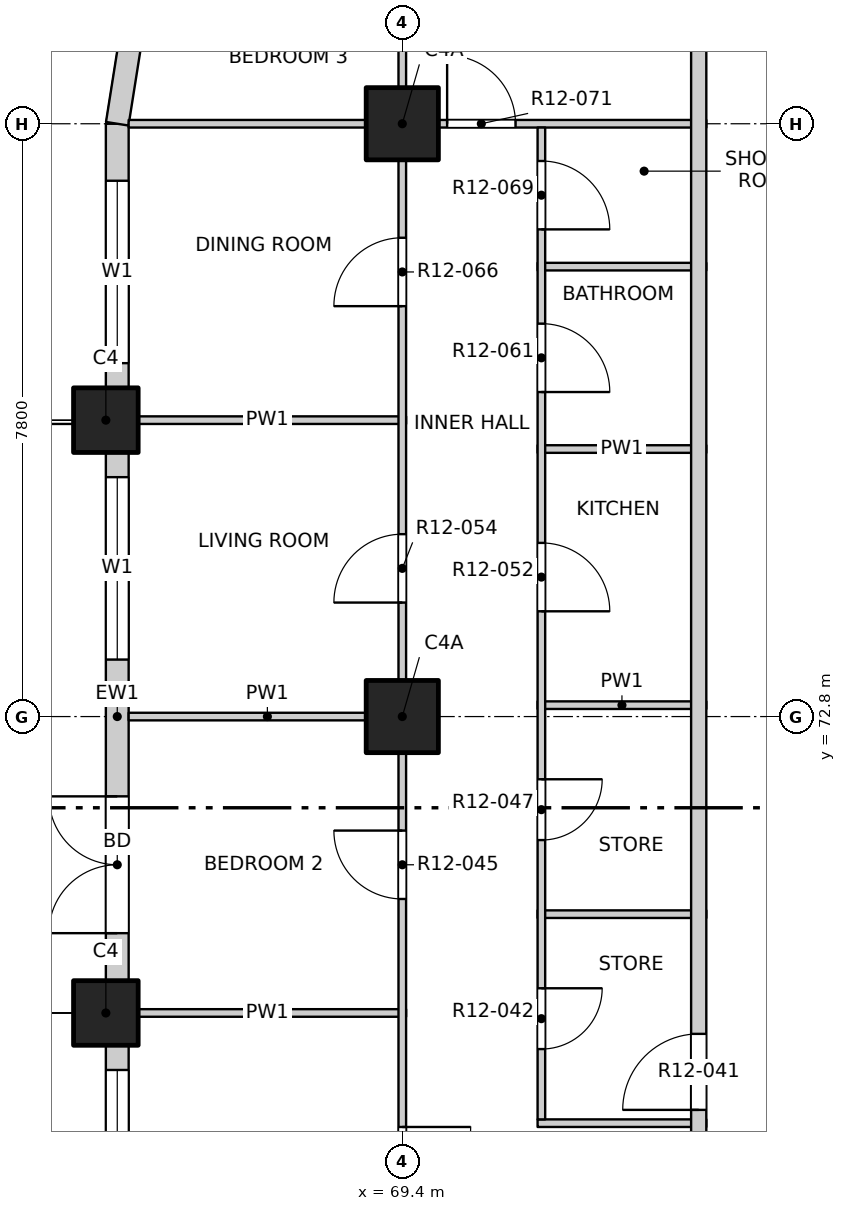
"""IFC4 building model, lengths in metres.
Left out: names, types, materials, properties, quantities, classifications, styles, units other than length and angle.
Written with IfcOpenShell. Run it as: python <this file> out.ifc"""

import sys

from ifc_helpers import new_model, si_unit, direction, frame, frame_2d, origin, origin_2d, place, context, subcontext, project, spatial, rectangle, extrude, element, fill, save


model = new_model("IFC4")
c1 = context("Model", 3, precision=1e-05, world=origin(), true_north=direction((0.0, 1.0)))
c2 = subcontext(c1, "Body", "Model", "MODEL_VIEW")
j1 = project(units=[si_unit("LENGTHUNIT", "METRE"), si_unit("PLANEANGLEUNIT", "RADIAN")], contexts=[c1])
p1 = place(None, origin())
s1 = spatial("IfcSite", under=j1, at=p1, CompositionType="ELEMENT")
p2 = place(p1, origin())
s2 = spatial("IfcBuilding", under=s1, at=p2, CompositionType="ELEMENT")
p3 = place(p2, frame((0.0, 0.0, 137.3)))
s3 = spatial("IfcBuildingStorey", under=s2, at=p3, CompositionType="ELEMENT", Elevation=137.3)
for number, where, z_axis, x_axis in (
    (1, (65.5, 68.9, -0.25), (0.0, 0.0, 1.0), (1.0, 0.0, 0.0)),
    (2, (65.5, 76.7, -0.25), (0.0, 0.0, 1.0), (1.0, 0.0, 0.0)),
):
    element("IfcColumn", number, at=place(p3, frame(where, z_axis=z_axis, x_axis=x_axis)), inside=s3, PredefinedType="COLUMN", context=c2, shape_type="SweptSolid", body=[
        extrude(rectangle(XDim=0.85, YDim=0.85, at=origin_2d()), origin(), (0.0, 0.0, 1.0), 3.4),
    ])
for number, where, z_axis, x_axis in (
    (3, (69.4, 72.8, -0.25), (0.0, 0.0, 1.0), (1.0, 0.0, 0.0)),
    (4, (69.4, 80.6, -0.25), (0.0, 0.0, 1.0), (1.0, 0.0, 0.0)),
):
    element("IfcColumn", number, at=place(p3, frame(where, z_axis=z_axis, x_axis=x_axis)), inside=s3, PredefinedType="COLUMN", context=c2, shape_type="SweptSolid", body=[
        extrude(rectangle(XDim=0.95, YDim=0.95, at=origin_2d()), origin(), (0.0, 0.0, 1.0), 3.4),
    ])
p4 = place(p3, frame((65.65, 61.525, 0.0), z_axis=(0.0, 0.0, 1.0), x_axis=(0.0, 1.0, 0.0)))
e5 = element("IfcWall", 5, at=p4, inside=s3, PredefinedType="SOLIDWALL", context=c2, shape_type="SweptSolid", body=[
    extrude(rectangle(XDim=6.95, YDim=0.3, at=frame_2d((3.475, 0.0))), origin(), (0.0, 0.0, 1.0), 2.7),
])
p5 = place(p4, frame((0.625, 0.0, 0.0)))
e6 = element("IfcOpeningElement", 6, at=p5, cuts=e5, PredefinedType="OPENING", context=c2, shape_type="SweptSolid", body=[
    extrude(rectangle(XDim=1.8, YDim=2.4, at=frame_2d((0.9, 1.2))), frame((0.0, 0.16, 0.0), z_axis=(0.0, -1.0, 0.0), x_axis=(1.0, 0.0, 0.0)), (0.0, 0.0, 1.0), 0.32),
])
p6 = place(p4, frame((4.225, 0.0, 0.9)))
e7 = element("IfcOpeningElement", 7, at=p6, cuts=e5, PredefinedType="OPENING", context=c2, shape_type="SweptSolid", body=[
    extrude(rectangle(XDim=2.4, YDim=1.8, at=frame_2d((1.2, 0.9))), frame((0.0, 0.16, 0.0), z_axis=(0.0, -1.0, 0.0), x_axis=(1.0, 0.0, 0.0)), (0.0, 0.0, 1.0), 0.32),
])
p7 = place(p3, frame((65.65, 69.325, 0.0), z_axis=(0.0, 0.0, 1.0), x_axis=(0.0, 1.0, 0.0)))
e8 = element("IfcWall", 8, at=p7, inside=s3, PredefinedType="SOLIDWALL", context=c2, shape_type="SweptSolid", body=[
    extrude(rectangle(XDim=6.95, YDim=0.3, at=frame_2d((3.475, 0.0))), origin(), (0.0, 0.0, 1.0), 2.7),
])
p8 = place(p7, frame((0.625, 0.0, 0.0)))
e9 = element("IfcOpeningElement", 9, at=p8, cuts=e8, PredefinedType="OPENING", context=c2, shape_type="SweptSolid", body=[
    extrude(rectangle(XDim=1.8, YDim=2.4, at=frame_2d((0.9, 1.2))), frame((0.0, 0.16, 0.0), z_axis=(0.0, -1.0, 0.0), x_axis=(1.0, 0.0, 0.0)), (0.0, 0.0, 1.0), 0.32),
])
p9 = place(p7, frame((4.225, 0.0, 0.9)))
e10 = element("IfcOpeningElement", 10, at=p9, cuts=e8, PredefinedType="OPENING", context=c2, shape_type="SweptSolid", body=[
    extrude(rectangle(XDim=2.4, YDim=1.8, at=frame_2d((1.2, 0.9))), frame((0.0, 0.16, 0.0), z_axis=(0.0, -1.0, 0.0), x_axis=(1.0, 0.0, 0.0)), (0.0, 0.0, 1.0), 0.32),
])
p10 = place(p3, frame((65.65, 77.125, 0.0), z_axis=(0.0, 0.0, 1.0), x_axis=(0.0, 1.0, 0.0)))
e11 = element("IfcWall", 11, at=p10, inside=s3, PredefinedType="SOLIDWALL", context=c2, shape_type="SweptSolid", body=[
    extrude(rectangle(XDim=3.475, YDim=0.3, at=frame_2d((1.738, 0.0))), origin(), (0.0, 0.0, 1.0), 2.7),
])
p11 = place(p10, frame((0.325, 0.0, 0.9)))
e12 = element("IfcOpeningElement", 12, at=p11, cuts=e11, PredefinedType="OPENING", context=c2, shape_type="SweptSolid", body=[
    extrude(rectangle(XDim=2.4, YDim=1.8, at=frame_2d((1.2, 0.9))), frame((0.0, 0.16, 0.0), z_axis=(0.0, -1.0, 0.0), x_axis=(1.0, 0.0, 0.0)), (0.0, 0.0, 1.0), 0.32),
])
p12 = place(p3, frame((65.833, 81.759, 0.0), z_axis=(0.0, 0.0, 1.0), x_axis=(-0.156496880861, -0.987678452879, 0.0)))
e13 = element("IfcWall", 13, at=p12, inside=s3, PredefinedType="SOLIDWALL", context=c2, shape_type="SweptSolid", body=[
    extrude(rectangle(XDim=1.173, YDim=0.3, at=frame_2d((0.586, 0.0))), origin(), (0.0, 0.0, 1.0), 2.7),
])
p13 = place(p3, frame((71.18, 67.45, 0.0), z_axis=(0.0, 0.0, 1.0), x_axis=(1.0, 0.0, 0.0)))
e14 = element("IfcWall", 14, at=p13, inside=s3, PredefinedType="PARTITIONING", context=c2, shape_type="SweptSolid", body=[
    extrude(rectangle(XDim=2.22, YDim=0.1, at=frame_2d((1.11, 0.0))), origin(), (0.0, 0.0, 1.0), 3.15),
])
p14 = place(p3, frame((65.8, 68.9, 0.0), z_axis=(0.0, 0.0, 1.0), x_axis=(1.0, 0.0, 0.0)))
e15 = element("IfcWall", 15, at=p14, inside=s3, PredefinedType="PARTITIONING", context=c2, shape_type="SweptSolid", body=[
    extrude(rectangle(XDim=3.65, YDim=0.1, at=frame_2d((1.825, 0.0))), origin(), (0.0, 0.0, 1.0), 2.55),
])
p15 = place(p3, frame((71.18, 70.2, 0.0), z_axis=(0.0, 0.0, 1.0), x_axis=(1.0, 0.0, 0.0)))
e16 = element("IfcWall", 16, at=p15, inside=s3, PredefinedType="PARTITIONING", context=c2, shape_type="SweptSolid", body=[
    extrude(rectangle(XDim=2.22, YDim=0.1, at=frame_2d((1.11, 0.0))), origin(), (0.0, 0.0, 1.0), 3.15),
])
p16 = place(p3, frame((65.8, 72.8, 0.0), z_axis=(0.0, 0.0, 1.0), x_axis=(1.0, 0.0, 0.0)))
e17 = element("IfcWall", 17, at=p16, inside=s3, PredefinedType="PARTITIONING", context=c2, shape_type="SweptSolid", body=[
    extrude(rectangle(XDim=3.65, YDim=0.1, at=frame_2d((1.825, 0.0))), origin(), (0.0, 0.0, 1.0), 3.15),
])
for number, where, z_axis, x_axis in (
    (18, (71.18, 72.95, 0.0), (0.0, 0.0, 1.0), (1.0, 0.0, 0.0)),
    (19, (71.18, 76.32, 0.0), (0.0, 0.0, 1.0), (1.0, 0.0, 0.0)),
):
    element("IfcWall", number, at=place(p3, frame(where, z_axis=z_axis, x_axis=x_axis)), inside=s3, PredefinedType="PARTITIONING", context=c2, shape_type="SweptSolid", body=[
        extrude(rectangle(XDim=2.22, YDim=0.1, at=frame_2d((1.11, 0.0))), origin(), (0.0, 0.0, 1.0), 3.15),
    ])
p17 = place(p3, frame((65.8, 76.7, 0.0), z_axis=(0.0, 0.0, 1.0), x_axis=(1.0, 0.0, 0.0)))
e20 = element("IfcWall", 20, at=p17, inside=s3, PredefinedType="PARTITIONING", context=c2, shape_type="SweptSolid", body=[
    extrude(rectangle(XDim=3.65, YDim=0.1, at=frame_2d((1.825, 0.0))), origin(), (0.0, 0.0, 1.0), 2.55),
])
p18 = place(p3, frame((71.18, 78.72, 0.0), z_axis=(0.0, 0.0, 1.0), x_axis=(1.0, 0.0, 0.0)))
e21 = element("IfcWall", 21, at=p18, inside=s3, PredefinedType="PARTITIONING", context=c2, shape_type="SweptSolid", body=[
    extrude(rectangle(XDim=2.22, YDim=0.1, at=frame_2d((1.11, 0.0))), origin(), (0.0, 0.0, 1.0), 3.15),
])
p19 = place(p3, frame((65.8, 80.6, 0.0), z_axis=(0.0, 0.0, 1.0), x_axis=(1.0, 0.0, 0.0)))
e22 = element("IfcWall", 22, at=p19, inside=s3, PredefinedType="PARTITIONING", context=c2, shape_type="SweptSolid", body=[
    extrude(rectangle(XDim=7.6, YDim=0.1, at=frame_2d((3.8, 0.0))), origin(), (0.0, 0.0, 1.0), 3.15),
])
p20 = place(p19, frame((4.19, 0.0, 0.0)))
e23 = element("IfcOpeningElement", 23, at=p20, cuts=e22, PredefinedType="OPENING", context=c2, shape_type="SweptSolid", body=[
    extrude(rectangle(XDim=0.9, YDim=2.1, at=frame_2d((0.45, 1.05))), frame((0.0, 0.06, 0.0), z_axis=(0.0, -1.0, 0.0), x_axis=(1.0, 0.0, 0.0)), (0.0, 0.0, 1.0), 0.12),
])
p21 = place(p3, frame((69.4, 45.8, 0.0), z_axis=(0.0, 0.0, 1.0), x_axis=(0.0, 1.0, 0.0)))
e24 = element("IfcWall", 24, at=p21, inside=s3, PredefinedType="PARTITIONING", context=c2, shape_type="SweptSolid", body=[
    extrude(rectangle(XDim=38.4, YDim=0.1, at=frame_2d((19.2, 0.0))), origin(), (0.0, 0.0, 1.0), 3.15),
])
p22 = place(p21, frame((1.05, 0.0, 0.0)))
e25 = element("IfcOpeningElement", 25, at=p22, cuts=e24, PredefinedType="OPENING", context=c2, shape_type="SweptSolid", body=[
    extrude(rectangle(XDim=1.2, YDim=2.1, at=frame_2d((0.6, 1.05))), frame((0.0, 0.06, 0.0), z_axis=(0.0, -1.0, 0.0), x_axis=(1.0, 0.0, 0.0)), (0.0, 0.0, 1.0), 0.12),
])
p23 = place(p21, frame((5.1, 0.0, 0.0)))
e26 = element("IfcOpeningElement", 26, at=p23, cuts=e24, PredefinedType="OPENING", context=c2, shape_type="SweptSolid", body=[
    extrude(rectangle(XDim=0.9, YDim=2.1, at=frame_2d((0.45, 1.05))), frame((0.0, 0.06, 0.0), z_axis=(0.0, -1.0, 0.0), x_axis=(1.0, 0.0, 0.0)), (0.0, 0.0, 1.0), 0.12),
])
p24 = place(p21, frame((9.0, 0.0, 0.0)))
e27 = element("IfcOpeningElement", 27, at=p24, cuts=e24, PredefinedType="OPENING", context=c2, shape_type="SweptSolid", body=[
    extrude(rectangle(XDim=0.9, YDim=2.1, at=frame_2d((0.45, 1.05))), frame((0.0, 0.06, 0.0), z_axis=(0.0, -1.0, 0.0), x_axis=(1.0, 0.0, 0.0)), (0.0, 0.0, 1.0), 0.12),
])
p25 = place(p21, frame((12.9, 0.0, 0.0)))
e28 = element("IfcOpeningElement", 28, at=p25, cuts=e24, PredefinedType="OPENING", context=c2, shape_type="SweptSolid", body=[
    extrude(rectangle(XDim=0.9, YDim=2.1, at=frame_2d((0.45, 1.05))), frame((0.0, 0.06, 0.0), z_axis=(0.0, -1.0, 0.0), x_axis=(1.0, 0.0, 0.0)), (0.0, 0.0, 1.0), 0.12),
])
p26 = place(p21, frame((16.8, 0.0, 0.0)))
e29 = element("IfcOpeningElement", 29, at=p26, cuts=e24, PredefinedType="OPENING", context=c2, shape_type="SweptSolid", body=[
    extrude(rectangle(XDim=0.9, YDim=2.1, at=frame_2d((0.45, 1.05))), frame((0.0, 0.06, 0.0), z_axis=(0.0, -1.0, 0.0), x_axis=(1.0, 0.0, 0.0)), (0.0, 0.0, 1.0), 0.12),
])
p27 = place(p21, frame((20.7, 0.0, 0.0)))
e30 = element("IfcOpeningElement", 30, at=p27, cuts=e24, PredefinedType="OPENING", context=c2, shape_type="SweptSolid", body=[
    extrude(rectangle(XDim=0.9, YDim=2.1, at=frame_2d((0.45, 1.05))), frame((0.0, 0.06, 0.0), z_axis=(0.0, -1.0, 0.0), x_axis=(1.0, 0.0, 0.0)), (0.0, 0.0, 1.0), 0.12),
])
p28 = place(p21, frame((24.6, 0.0, 0.0)))
e31 = element("IfcOpeningElement", 31, at=p28, cuts=e24, PredefinedType="OPENING", context=c2, shape_type="SweptSolid", body=[
    extrude(rectangle(XDim=0.9, YDim=2.1, at=frame_2d((0.45, 1.05))), frame((0.0, 0.06, 0.0), z_axis=(0.0, -1.0, 0.0), x_axis=(1.0, 0.0, 0.0)), (0.0, 0.0, 1.0), 0.12),
])
p29 = place(p21, frame((28.5, 0.0, 0.0)))
e32 = element("IfcOpeningElement", 32, at=p29, cuts=e24, PredefinedType="OPENING", context=c2, shape_type="SweptSolid", body=[
    extrude(rectangle(XDim=0.9, YDim=2.1, at=frame_2d((0.45, 1.05))), frame((0.0, 0.06, 0.0), z_axis=(0.0, -1.0, 0.0), x_axis=(1.0, 0.0, 0.0)), (0.0, 0.0, 1.0), 0.12),
])
p30 = place(p21, frame((32.4, 0.0, 0.0)))
e33 = element("IfcOpeningElement", 33, at=p30, cuts=e24, PredefinedType="OPENING", context=c2, shape_type="SweptSolid", body=[
    extrude(rectangle(XDim=0.9, YDim=2.1, at=frame_2d((0.45, 1.05))), frame((0.0, 0.06, 0.0), z_axis=(0.0, -1.0, 0.0), x_axis=(1.0, 0.0, 0.0)), (0.0, 0.0, 1.0), 0.12),
])
p31 = place(p21, frame((36.15, 0.0, 0.0)))
e34 = element("IfcOpeningElement", 34, at=p31, cuts=e24, PredefinedType="OPENING", context=c2, shape_type="SweptSolid", body=[
    extrude(rectangle(XDim=1.2, YDim=2.1, at=frame_2d((0.6, 1.05))), frame((0.0, 0.06, 0.0), z_axis=(0.0, -1.0, 0.0), x_axis=(1.0, 0.0, 0.0)), (0.0, 0.0, 1.0), 0.12),
])
p32 = place(p3, frame((71.23, 67.5, 0.0), z_axis=(0.0, 0.0, 1.0), x_axis=(0.0, 1.0, 0.0)))
e35 = element("IfcWall", 35, at=p32, inside=s3, PredefinedType="PARTITIONING", context=c2, shape_type="SweptSolid", body=[
    extrude(rectangle(XDim=13.05, YDim=0.1, at=frame_2d((6.525, 0.0))), origin(), (0.0, 0.0, 1.0), 3.15),
])
p33 = place(p32, frame((0.925, 0.0, 0.0)))
e36 = element("IfcOpeningElement", 36, at=p33, cuts=e35, PredefinedType="OPENING", context=c2, shape_type="SweptSolid", body=[
    extrude(rectangle(XDim=0.8, YDim=2.1, at=frame_2d((0.4, 1.05))), frame((0.0, 0.06, 0.0), z_axis=(0.0, -1.0, 0.0), x_axis=(1.0, 0.0, 0.0)), (0.0, 0.0, 1.0), 0.12),
])
p34 = place(p32, frame((3.675, 0.0, 0.0)))
e37 = element("IfcOpeningElement", 37, at=p34, cuts=e35, PredefinedType="OPENING", context=c2, shape_type="SweptSolid", body=[
    extrude(rectangle(XDim=0.8, YDim=2.1, at=frame_2d((0.4, 1.05))), frame((0.0, 0.06, 0.0), z_axis=(0.0, -1.0, 0.0), x_axis=(1.0, 0.0, 0.0)), (0.0, 0.0, 1.0), 0.12),
])
p35 = place(p32, frame((6.685, 0.0, 0.0)))
e38 = element("IfcOpeningElement", 38, at=p35, cuts=e35, PredefinedType="OPENING", context=c2, shape_type="SweptSolid", body=[
    extrude(rectangle(XDim=0.9, YDim=2.1, at=frame_2d((0.45, 1.05))), frame((0.0, 0.06, 0.0), z_axis=(0.0, -1.0, 0.0), x_axis=(1.0, 0.0, 0.0)), (0.0, 0.0, 1.0), 0.12),
])
p36 = place(p32, frame((9.57, 0.0, 0.0)))
e39 = element("IfcOpeningElement", 39, at=p36, cuts=e35, PredefinedType="OPENING", context=c2, shape_type="SweptSolid", body=[
    extrude(rectangle(XDim=0.9, YDim=2.1, at=frame_2d((0.45, 1.05))), frame((0.0, 0.06, 0.0), z_axis=(0.0, -1.0, 0.0), x_axis=(1.0, 0.0, 0.0)), (0.0, 0.0, 1.0), 0.12),
])
p37 = place(p32, frame((11.71, 0.0, 0.0)))
e40 = element("IfcOpeningElement", 40, at=p37, cuts=e35, PredefinedType="OPENING", context=c2, shape_type="SweptSolid", body=[
    extrude(rectangle(XDim=0.9, YDim=2.1, at=frame_2d((0.45, 1.05))), frame((0.0, 0.06, 0.0), z_axis=(0.0, -1.0, 0.0), x_axis=(1.0, 0.0, 0.0)), (0.0, 0.0, 1.0), 0.12),
])
p38 = place(p3, frame((73.3, 49.5, 0.0), z_axis=(0.0, 0.0, 1.0), x_axis=(0.0, 1.0, 0.0)))
e41 = element("IfcWall", 41, at=p38, inside=s3, PredefinedType="PARTITIONING", context=c2, shape_type="SweptSolid", body=[
    extrude(rectangle(XDim=34.7, YDim=0.2, at=frame_2d((17.35, 0.0))), origin(), (0.0, 0.0, 1.0), 3.15),
])
p39 = place(p38, frame((6.975, 0.0, 0.0)))
e42 = element("IfcOpeningElement", 42, at=p39, cuts=e41, PredefinedType="OPENING", context=c2, shape_type="SweptSolid", body=[
    extrude(rectangle(XDim=1.0, YDim=2.1, at=frame_2d((0.5, 1.05))), frame((0.0, 0.11, 0.0), z_axis=(0.0, -1.0, 0.0), x_axis=(1.0, 0.0, 0.0)), (0.0, 0.0, 1.0), 0.22),
])
p40 = place(p38, frame((18.125, 0.0, 0.0)))
e43 = element("IfcOpeningElement", 43, at=p40, cuts=e41, PredefinedType="OPENING", context=c2, shape_type="SweptSolid", body=[
    extrude(rectangle(XDim=1.0, YDim=2.1, at=frame_2d((0.5, 1.05))), frame((0.0, 0.11, 0.0), z_axis=(0.0, -1.0, 0.0), x_axis=(1.0, 0.0, 0.0)), (0.0, 0.0, 1.0), 0.22),
])
p41 = place(p6, origin())
e44 = element("IfcWindow", 44, at=p41, inside=s3, PartitioningType="DOUBLE_PANEL_VERTICAL", PredefinedType="WINDOW", context=c2, shape_type="SweptSolid", body=[
    extrude(rectangle(XDim=2.4, YDim=1.8, at=frame_2d((1.2, 0.9))), frame((0.0, 0.03, 0.0), z_axis=(0.0, -1.0, 0.0), x_axis=(1.0, 0.0, 0.0)), (0.0, 0.0, 1.0), 0.06),
])
fill(e7, e44)
p42 = place(p8, origin())
e45 = element("IfcDoor", 45, at=p42, inside=s3, OperationType="DOUBLE_DOOR_SINGLE_SWING", PredefinedType="DOOR", context=c2, shape_type="SweptSolid", body=[
    extrude(rectangle(XDim=1.8, YDim=2.4, at=frame_2d((0.9, 1.2))), frame((0.0, 0.025, 0.0), z_axis=(0.0, -1.0, 0.0), x_axis=(1.0, 0.0, 0.0)), (0.0, 0.0, 1.0), 0.05),
])
fill(e9, e45)
p43 = place(p9, origin())
e46 = element("IfcWindow", 46, at=p43, inside=s3, PartitioningType="DOUBLE_PANEL_VERTICAL", PredefinedType="WINDOW", context=c2, shape_type="SweptSolid", body=[
    extrude(rectangle(XDim=2.4, YDim=1.8, at=frame_2d((1.2, 0.9))), frame((0.0, 0.03, 0.0), z_axis=(0.0, -1.0, 0.0), x_axis=(1.0, 0.0, 0.0)), (0.0, 0.0, 1.0), 0.06),
])
fill(e10, e46)
p44 = place(p11, origin())
e47 = element("IfcWindow", 47, at=p44, inside=s3, PartitioningType="DOUBLE_PANEL_VERTICAL", PredefinedType="WINDOW", context=c2, shape_type="SweptSolid", body=[
    extrude(rectangle(XDim=2.4, YDim=1.8, at=frame_2d((1.2, 0.9))), frame((0.0, 0.03, 0.0), z_axis=(0.0, -1.0, 0.0), x_axis=(1.0, 0.0, 0.0)), (0.0, 0.0, 1.0), 0.06),
])
fill(e12, e47)
p45 = place(p27, origin())
e48 = element("IfcDoor", 48, at=p45, inside=s3, OperationType="SINGLE_SWING_LEFT", PredefinedType="DOOR", context=c2, shape_type="SweptSolid", body=[
    extrude(rectangle(XDim=0.9, YDim=2.1, at=frame_2d((0.45, 1.05))), frame((0.0, 0.025, 0.0), z_axis=(0.0, -1.0, 0.0), x_axis=(1.0, 0.0, 0.0)), (0.0, 0.0, 1.0), 0.05),
])
fill(e30, e48)
p46 = place(p40, origin())
e49 = element("IfcDoor", 49, at=p46, inside=s3, OperationType="SINGLE_SWING_RIGHT", PredefinedType="DOOR", context=c2, shape_type="SweptSolid", body=[
    extrude(rectangle(XDim=1.0, YDim=2.1, at=frame_2d((0.5, 1.05))), frame((0.0, 0.025, 0.0), z_axis=(0.0, -1.0, 0.0), x_axis=(1.0, 0.0, 0.0)), (0.0, 0.0, 1.0), 0.05),
])
fill(e43, e49)
p47 = place(p33, origin())
e50 = element("IfcDoor", 50, at=p47, inside=s3, OperationType="SINGLE_SWING_LEFT", PredefinedType="DOOR", context=c2, shape_type="SweptSolid", body=[
    extrude(rectangle(XDim=0.8, YDim=2.1, at=frame_2d((0.4, 1.05))), frame((0.0, 0.025, 0.0), z_axis=(0.0, -1.0, 0.0), x_axis=(1.0, 0.0, 0.0)), (0.0, 0.0, 1.0), 0.05),
])
fill(e36, e50)
p48 = place(p28, origin())
e51 = element("IfcDoor", 51, at=p48, inside=s3, OperationType="SINGLE_SWING_RIGHT", PredefinedType="DOOR", context=c2, shape_type="SweptSolid", body=[
    extrude(rectangle(XDim=0.9, YDim=2.1, at=frame_2d((0.45, 1.05))), frame((0.0, 0.025, 0.0), z_axis=(0.0, -1.0, 0.0), x_axis=(1.0, 0.0, 0.0)), (0.0, 0.0, 1.0), 0.05),
])
fill(e31, e51)
p49 = place(p34, origin())
e52 = element("IfcDoor", 52, at=p49, inside=s3, OperationType="SINGLE_SWING_LEFT", PredefinedType="DOOR", context=c2, shape_type="SweptSolid", body=[
    extrude(rectangle(XDim=0.8, YDim=2.1, at=frame_2d((0.4, 1.05))), frame((0.0, 0.025, 0.0), z_axis=(0.0, -1.0, 0.0), x_axis=(1.0, 0.0, 0.0)), (0.0, 0.0, 1.0), 0.05),
])
fill(e37, e52)
p50 = place(p35, origin())
e53 = element("IfcDoor", 53, at=p50, inside=s3, OperationType="SINGLE_SWING_RIGHT", PredefinedType="DOOR", context=c2, shape_type="SweptSolid", body=[
    extrude(rectangle(XDim=0.9, YDim=2.1, at=frame_2d((0.45, 1.05))), frame((0.0, 0.025, 0.0), z_axis=(0.0, -1.0, 0.0), x_axis=(1.0, 0.0, 0.0)), (0.0, 0.0, 1.0), 0.05),
])
fill(e38, e53)
p51 = place(p29, origin())
e54 = element("IfcDoor", 54, at=p51, inside=s3, OperationType="SINGLE_SWING_LEFT", PredefinedType="DOOR", context=c2, shape_type="SweptSolid", body=[
    extrude(rectangle(XDim=0.9, YDim=2.1, at=frame_2d((0.45, 1.05))), frame((0.0, 0.025, 0.0), z_axis=(0.0, -1.0, 0.0), x_axis=(1.0, 0.0, 0.0)), (0.0, 0.0, 1.0), 0.05),
])
fill(e32, e54)
p52 = place(p36, origin())
e55 = element("IfcDoor", 55, at=p52, inside=s3, OperationType="SINGLE_SWING_RIGHT", PredefinedType="DOOR", context=c2, shape_type="SweptSolid", body=[
    extrude(rectangle(XDim=0.9, YDim=2.1, at=frame_2d((0.45, 1.05))), frame((0.0, 0.025, 0.0), z_axis=(0.0, -1.0, 0.0), x_axis=(1.0, 0.0, 0.0)), (0.0, 0.0, 1.0), 0.05),
])
fill(e39, e55)
p53 = place(p30, origin())
e56 = element("IfcDoor", 56, at=p53, inside=s3, OperationType="SINGLE_SWING_LEFT", PredefinedType="DOOR", context=c2, shape_type="SweptSolid", body=[
    extrude(rectangle(XDim=0.9, YDim=2.1, at=frame_2d((0.45, 1.05))), frame((0.0, 0.025, 0.0), z_axis=(0.0, -1.0, 0.0), x_axis=(1.0, 0.0, 0.0)), (0.0, 0.0, 1.0), 0.05),
])
fill(e33, e56)
p54 = place(p37, origin())
e57 = element("IfcDoor", 57, at=p54, inside=s3, OperationType="SINGLE_SWING_RIGHT", PredefinedType="DOOR", context=c2, shape_type="SweptSolid", body=[
    extrude(rectangle(XDim=0.9, YDim=2.1, at=frame_2d((0.45, 1.05))), frame((0.0, 0.025, 0.0), z_axis=(0.0, -1.0, 0.0), x_axis=(1.0, 0.0, 0.0)), (0.0, 0.0, 1.0), 0.05),
])
fill(e40, e57)
p55 = place(p20, origin())
e58 = element("IfcDoor", 58, at=p55, inside=s3, OperationType="SINGLE_SWING_LEFT", PredefinedType="DOOR", context=c2, shape_type="SweptSolid", body=[
    extrude(rectangle(XDim=0.9, YDim=2.1, at=frame_2d((0.45, 1.05))), frame((0.0, 0.025, 0.0), z_axis=(0.0, -1.0, 0.0), x_axis=(1.0, 0.0, 0.0)), (0.0, 0.0, 1.0), 0.05),
])
fill(e23, e58)
save(model, sys.argv[1])
